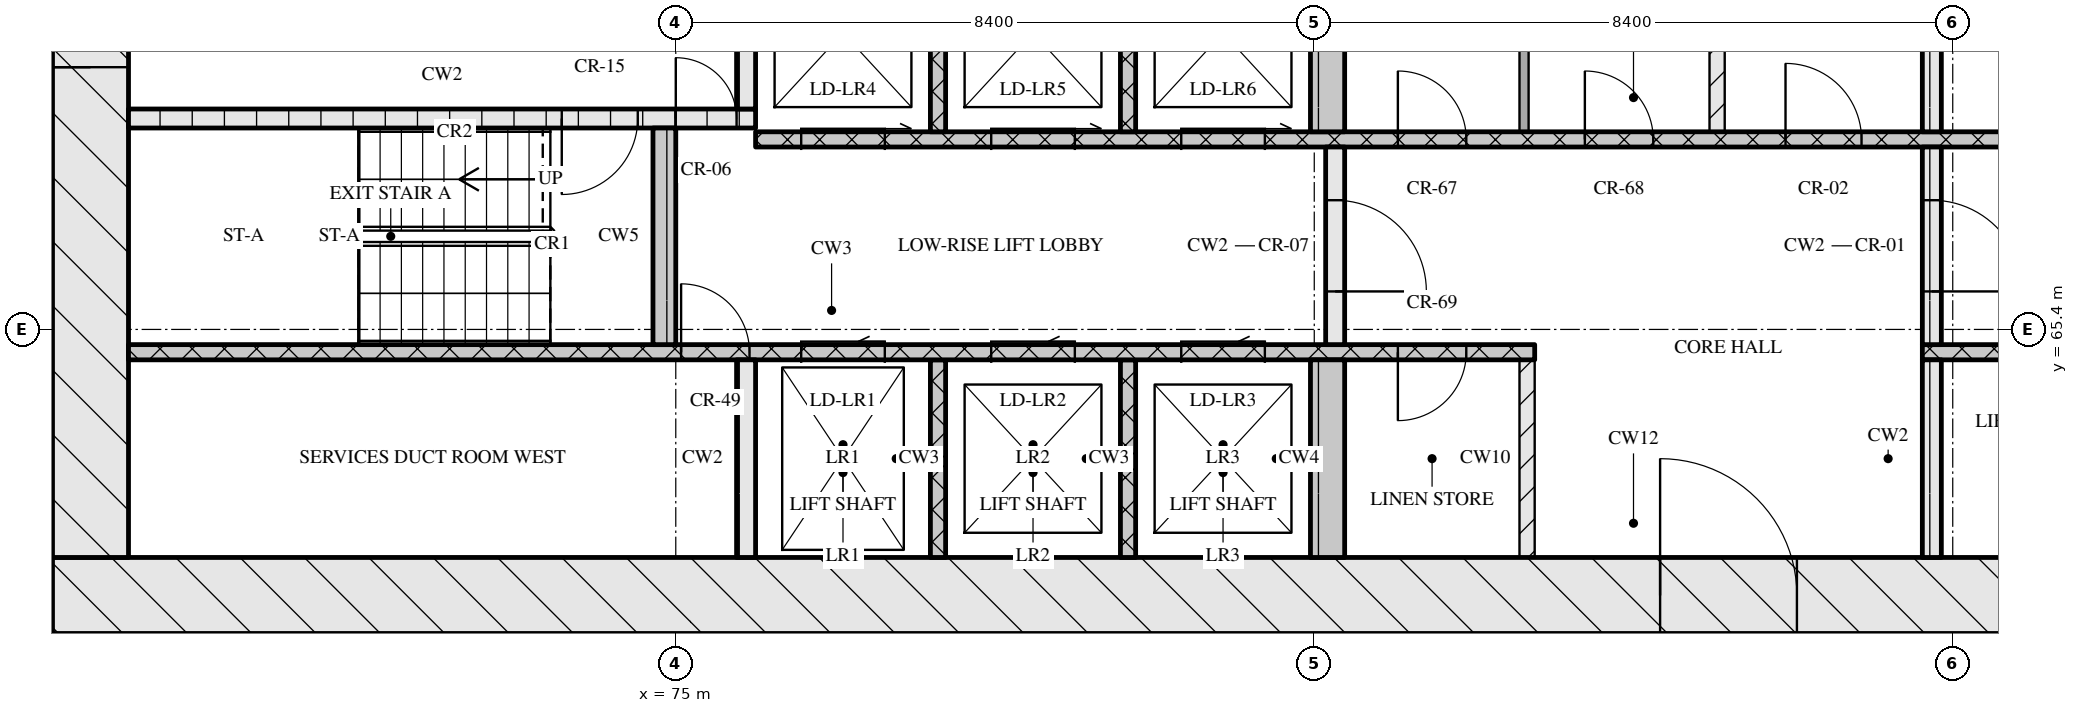
"""IFC4 building model, lengths in metres.
Left out: names, types, materials, properties, quantities, classifications, styles, units other than length and angle.
Written with IfcOpenShell. Run it as: python <this file> out.ifc"""

import sys

from ifc_helpers import new_model, si_unit, direction, frame, frame_2d, origin, place, context, subcontext, project, spatial, rectangle, extrude, element, fill, save


model = new_model("IFC4")
c1 = context("Model", 3, precision=1e-05, world=origin(), true_north=direction((0.0, 1.0)))
c2 = subcontext(c1, "Body", "Model", "MODEL_VIEW")
j1 = project(units=[si_unit("LENGTHUNIT", "METRE"), si_unit("PLANEANGLEUNIT", "RADIAN")], contexts=[c1])
p1 = place(None, origin())
s1 = spatial("IfcSite", under=j1, at=p1, CompositionType="ELEMENT")
p2 = place(p1, origin())
s2 = spatial("IfcBuilding", under=s1, at=p2, CompositionType="ELEMENT")
p3 = place(p2, frame((0.0, 0.0, 127.65)))
s3 = spatial("IfcBuildingStorey", under=s2, at=p3, CompositionType="ELEMENT", Elevation=127.65)
p4 = place(p3, frame((66.8, 61.9, 0.0), z_axis=(0.0, 0.0, 1.0), x_axis=(1.0, 0.0, 0.0)))
e1 = element("IfcWall", 1, at=p4, inside=s3, PredefinedType="SOLIDWALL", context=c2, shape_type="SweptSolid", body=[
    extrude(rectangle(XDim=41.6, YDim=1.0, at=frame_2d((20.8, 0.0))), origin(), (0.0, 0.0, 1.0), 3.32),
])
p5 = place(p4, frame((21.15, 0.0, 0.0)))
e2 = element("IfcOpeningElement", 2, at=p5, cuts=e1, PredefinedType="OPENING", context=c2, shape_type="SweptSolid", body=[
    extrude(rectangle(XDim=1.8, YDim=2.1, at=frame_2d((0.9, 1.05))), frame((0.0, 0.51, 0.0), z_axis=(0.0, -1.0, 0.0), x_axis=(1.0, 0.0, 0.0)), (0.0, 0.0, 1.0), 1.02),
])
p6 = place(p3, frame((67.3, 62.4, 0.0), z_axis=(0.0, 0.0, 1.0), x_axis=(0.0, 1.0, 0.0)))
e3 = element("IfcWall", 3, at=p6, inside=s3, PredefinedType="SOLIDWALL", context=c2, shape_type="SweptSolid", body=[
    extrude(rectangle(XDim=12.0, YDim=1.0, at=frame_2d((6.0, 0.0))), origin(), (0.0, 0.0, 1.0), 3.32),
])
p7 = place(p6, frame((6.45, 0.0, 0.0)))
e4 = element("IfcOpeningElement", 4, at=p7, cuts=e3, PredefinedType="OPENING", context=c2, shape_type="SweptSolid", body=[
    extrude(rectangle(XDim=1.2, YDim=2.1, at=frame_2d((0.6, 1.05))), frame((0.0, 0.51, 0.0), z_axis=(0.0, -1.0, 0.0), x_axis=(1.0, 0.0, 0.0)), (0.0, 0.0, 1.0), 1.02),
])
p8 = place(p3, frame((75.925, 62.4, 0.0), z_axis=(0.0, 0.0, 1.0), x_axis=(0.0, 1.0, 0.0)))
e5 = element("IfcWall", 5, at=p8, inside=s3, PredefinedType="SOLIDWALL", context=c2, shape_type="SweptSolid", body=[
    extrude(rectangle(XDim=2.6, YDim=0.25, at=frame_2d((1.3, 0.0))), origin(), (0.0, 0.0, 1.0), 3.32),
])
for number, where, z_axis, x_axis in (
    (6, (78.45, 62.4, 0.0), (0.0, 0.0, 1.0), (0.0, 1.0, 0.0)),
    (7, (80.95, 62.4, 0.0), (0.0, 0.0, 1.0), (0.0, 1.0, 0.0)),
):
    element("IfcWall", number, at=place(p3, frame(where, z_axis=z_axis, x_axis=x_axis)), inside=s3, PredefinedType="SOLIDWALL", context=c2, shape_type="SweptSolid", body=[
        extrude(rectangle(XDim=2.6, YDim=0.2, at=frame_2d((1.3, 0.0))), origin(), (0.0, 0.0, 1.0), 3.32),
    ])
p9 = place(p3, frame((83.575, 62.4, 0.0), z_axis=(0.0, 0.0, 1.0), x_axis=(0.0, 1.0, 0.0)))
e8 = element("IfcWall", 8, at=p9, inside=s3, PredefinedType="SOLIDWALL", context=c2, shape_type="SweptSolid", body=[
    extrude(rectangle(XDim=2.6, YDim=0.45, at=frame_2d((1.3, 0.0))), origin(), (0.0, 0.0, 1.0), 3.32),
])
p10 = place(p3, frame((86.2, 62.4, 0.0), z_axis=(0.0, 0.0, 1.0), x_axis=(0.0, 1.0, 0.0)))
e9 = element("IfcWall", 9, at=p10, inside=s3, PredefinedType="PARTITIONING", context=c2, shape_type="SweptSolid", body=[
    extrude(rectangle(XDim=2.6, YDim=0.2, at=frame_2d((1.3, 0.0))), origin(), (0.0, 0.0, 1.0), 3.32),
])
p11 = place(p3, frame((91.525, 62.4, 0.0), z_axis=(0.0, 0.0, 1.0), x_axis=(0.0, 1.0, 0.0)))
e10 = element("IfcWall", 10, at=p11, inside=s3, PredefinedType="SOLIDWALL", context=c2, shape_type="SweptSolid", body=[
    extrude(rectangle(XDim=2.6, YDim=0.25, at=frame_2d((1.3, 0.0))), origin(), (0.0, 0.0, 1.0), 3.32),
])
p12 = place(p3, frame((67.8, 65.1, 0.0), z_axis=(0.0, 0.0, 1.0), x_axis=(1.0, 0.0, 0.0)))
e11 = element("IfcWall", 11, at=p12, inside=s3, PredefinedType="SOLIDWALL", context=c2, shape_type="SweptSolid", body=[
    extrude(rectangle(XDim=18.5, YDim=0.2, at=frame_2d((9.25, 0.0))), origin(), (0.0, 0.0, 1.0), 3.32),
])
p13 = place(p12, frame((7.27, 0.0, 0.0)))
e12 = element("IfcOpeningElement", 12, at=p13, cuts=e11, PredefinedType="OPENING", context=c2, shape_type="SweptSolid", body=[
    extrude(rectangle(XDim=0.9, YDim=2.1, at=frame_2d((0.45, 1.05))), frame((0.0, 0.11, 0.0), z_axis=(0.0, -1.0, 0.0), x_axis=(1.0, 0.0, 0.0)), (0.0, 0.0, 1.0), 0.22),
])
p14 = place(p12, frame((8.85, 0.0, 0.0)))
e13 = element("IfcOpeningElement", 13, at=p14, cuts=e11, PredefinedType="OPENING", context=c2, shape_type="SweptSolid", body=[
    extrude(rectangle(XDim=1.1, YDim=2.1, at=frame_2d((0.55, 1.05))), frame((0.0, 0.11, 0.0), z_axis=(0.0, -1.0, 0.0), x_axis=(1.0, 0.0, 0.0)), (0.0, 0.0, 1.0), 0.22),
])
p15 = place(p12, frame((11.35, 0.0, 0.0)))
e14 = element("IfcOpeningElement", 14, at=p15, cuts=e11, PredefinedType="OPENING", context=c2, shape_type="SweptSolid", body=[
    extrude(rectangle(XDim=1.1, YDim=2.1, at=frame_2d((0.55, 1.05))), frame((0.0, 0.11, 0.0), z_axis=(0.0, -1.0, 0.0), x_axis=(1.0, 0.0, 0.0)), (0.0, 0.0, 1.0), 0.22),
])
p16 = place(p12, frame((13.85, 0.0, 0.0)))
e15 = element("IfcOpeningElement", 15, at=p16, cuts=e11, PredefinedType="OPENING", context=c2, shape_type="SweptSolid", body=[
    extrude(rectangle(XDim=1.1, YDim=2.1, at=frame_2d((0.55, 1.05))), frame((0.0, 0.11, 0.0), z_axis=(0.0, -1.0, 0.0), x_axis=(1.0, 0.0, 0.0)), (0.0, 0.0, 1.0), 0.22),
])
p17 = place(p12, frame((16.7, 0.0, 0.0)))
e16 = element("IfcOpeningElement", 16, at=p17, cuts=e11, PredefinedType="OPENING", context=c2, shape_type="SweptSolid", body=[
    extrude(rectangle(XDim=0.9, YDim=2.1, at=frame_2d((0.45, 1.05))), frame((0.0, 0.11, 0.0), z_axis=(0.0, -1.0, 0.0), x_axis=(1.0, 0.0, 0.0)), (0.0, 0.0, 1.0), 0.22),
])
p18 = place(p3, frame((91.4, 65.1, 0.0), z_axis=(0.0, 0.0, 1.0), x_axis=(1.0, 0.0, 0.0)))
e17 = element("IfcWall", 17, at=p18, inside=s3, PredefinedType="SOLIDWALL", context=c2, shape_type="SweptSolid", body=[
    extrude(rectangle(XDim=16.0, YDim=0.2, at=frame_2d((8.0, 0.0))), origin(), (0.0, 0.0, 1.0), 3.32),
])
p19 = place(p18, frame((7.83, 0.0, 0.0)))
e18 = element("IfcOpeningElement", 18, at=p19, cuts=e17, PredefinedType="OPENING", context=c2, shape_type="SweptSolid", body=[
    extrude(rectangle(XDim=0.9, YDim=2.1, at=frame_2d((0.45, 1.05))), frame((0.0, 0.11, 0.0), z_axis=(0.0, -1.0, 0.0), x_axis=(1.0, 0.0, 0.0)), (0.0, 0.0, 1.0), 0.22),
])
p20 = place(p3, frame((74.85, 65.2, 0.0), z_axis=(0.0, 0.0, 1.0), x_axis=(0.0, 1.0, 0.0)))
e19 = element("IfcWall", 19, at=p20, inside=s3, PredefinedType="SOLIDWALL", context=c2, shape_type="SweptSolid", body=[
    extrude(rectangle(XDim=2.85, YDim=0.3, at=frame_2d((1.425, 0.0))), origin(), (0.0, 0.0, 1.0), 3.32),
])
p21 = place(p3, frame((83.675, 65.2, 0.0), z_axis=(0.0, 0.0, 1.0), x_axis=(0.0, 1.0, 0.0)))
e20 = element("IfcWall", 20, at=p21, inside=s3, PredefinedType="SOLIDWALL", context=c2, shape_type="SweptSolid", body=[
    extrude(rectangle(XDim=2.6, YDim=0.25, at=frame_2d((1.3, 0.0))), origin(), (0.0, 0.0, 1.0), 3.32),
])
p22 = place(p21, frame((0.7, 0.0, 0.0)))
e21 = element("IfcOpeningElement", 21, at=p22, cuts=e20, PredefinedType="OPENING", context=c2, shape_type="SweptSolid", body=[
    extrude(rectangle(XDim=1.2, YDim=2.1, at=frame_2d((0.6, 1.05))), frame((0.0, 0.135, 0.0), z_axis=(0.0, -1.0, 0.0), x_axis=(1.0, 0.0, 0.0)), (0.0, 0.0, 1.0), 0.27),
])
p23 = place(p3, frame((91.525, 65.2, 0.0), z_axis=(0.0, 0.0, 1.0), x_axis=(0.0, 1.0, 0.0)))
e22 = element("IfcWall", 22, at=p23, inside=s3, PredefinedType="SOLIDWALL", context=c2, shape_type="SweptSolid", body=[
    extrude(rectangle(XDim=2.6, YDim=0.25, at=frame_2d((1.3, 0.0))), origin(), (0.0, 0.0, 1.0), 3.32),
])
p24 = place(p23, frame((0.7, 0.0, 0.0)))
e23 = element("IfcOpeningElement", 23, at=p24, cuts=e22, PredefinedType="OPENING", context=c2, shape_type="SweptSolid", body=[
    extrude(rectangle(XDim=1.2, YDim=2.1, at=frame_2d((0.6, 1.05))), frame((0.0, 0.135, 0.0), z_axis=(0.0, -1.0, 0.0), x_axis=(1.0, 0.0, 0.0)), (0.0, 0.0, 1.0), 0.27),
])
p25 = place(p3, frame((76.05, 67.9, 0.0), z_axis=(0.0, 0.0, 1.0), x_axis=(1.0, 0.0, 0.0)))
e24 = element("IfcWall", 24, at=p25, inside=s3, PredefinedType="SOLIDWALL", context=c2, shape_type="SweptSolid", body=[
    extrude(rectangle(XDim=23.1, YDim=0.2, at=frame_2d((11.55, 0.0))), origin(), (0.0, 0.0, 1.0), 3.32),
])
p26 = place(p25, frame((0.6, 0.0, 0.0)))
e25 = element("IfcOpeningElement", 25, at=p26, cuts=e24, PredefinedType="OPENING", context=c2, shape_type="SweptSolid", body=[
    extrude(rectangle(XDim=1.1, YDim=2.1, at=frame_2d((0.55, 1.05))), frame((0.0, 0.11, 0.0), z_axis=(0.0, -1.0, 0.0), x_axis=(1.0, 0.0, 0.0)), (0.0, 0.0, 1.0), 0.22),
])
p27 = place(p25, frame((3.1, 0.0, 0.0)))
e26 = element("IfcOpeningElement", 26, at=p27, cuts=e24, PredefinedType="OPENING", context=c2, shape_type="SweptSolid", body=[
    extrude(rectangle(XDim=1.1, YDim=2.1, at=frame_2d((0.55, 1.05))), frame((0.0, 0.11, 0.0), z_axis=(0.0, -1.0, 0.0), x_axis=(1.0, 0.0, 0.0)), (0.0, 0.0, 1.0), 0.22),
])
p28 = place(p25, frame((5.6, 0.0, 0.0)))
e27 = element("IfcOpeningElement", 27, at=p28, cuts=e24, PredefinedType="OPENING", context=c2, shape_type="SweptSolid", body=[
    extrude(rectangle(XDim=1.1, YDim=2.1, at=frame_2d((0.55, 1.05))), frame((0.0, 0.11, 0.0), z_axis=(0.0, -1.0, 0.0), x_axis=(1.0, 0.0, 0.0)), (0.0, 0.0, 1.0), 0.22),
])
p29 = place(p25, frame((8.45, 0.0, 0.0)))
e28 = element("IfcOpeningElement", 28, at=p29, cuts=e24, PredefinedType="OPENING", context=c2, shape_type="SweptSolid", body=[
    extrude(rectangle(XDim=0.9, YDim=2.1, at=frame_2d((0.45, 1.05))), frame((0.0, 0.11, 0.0), z_axis=(0.0, -1.0, 0.0), x_axis=(1.0, 0.0, 0.0)), (0.0, 0.0, 1.0), 0.22),
])
p30 = place(p25, frame((10.91, 0.0, 0.0)))
e29 = element("IfcOpeningElement", 29, at=p30, cuts=e24, PredefinedType="OPENING", context=c2, shape_type="SweptSolid", body=[
    extrude(rectangle(XDim=0.9, YDim=2.1, at=frame_2d((0.45, 1.05))), frame((0.0, 0.11, 0.0), z_axis=(0.0, -1.0, 0.0), x_axis=(1.0, 0.0, 0.0)), (0.0, 0.0, 1.0), 0.22),
])
p31 = place(p25, frame((13.55, 0.0, 0.0)))
e30 = element("IfcOpeningElement", 30, at=p31, cuts=e24, PredefinedType="OPENING", context=c2, shape_type="SweptSolid", body=[
    extrude(rectangle(XDim=1.0, YDim=2.1, at=frame_2d((0.5, 1.05))), frame((0.0, 0.11, 0.0), z_axis=(0.0, -1.0, 0.0), x_axis=(1.0, 0.0, 0.0)), (0.0, 0.0, 1.0), 0.22),
])
for number, where, z_axis, x_axis in (
    (31, (78.45, 68.0, 0.0), (0.0, 0.0, 1.0), (0.0, 1.0, 0.0)),
    (32, (80.95, 68.0, 0.0), (0.0, 0.0, 1.0), (0.0, 1.0, 0.0)),
):
    element("IfcWall", number, at=place(p3, frame(where, z_axis=z_axis, x_axis=x_axis)), inside=s3, PredefinedType="SOLIDWALL", context=c2, shape_type="SweptSolid", body=[
        extrude(rectangle(XDim=2.6, YDim=0.2, at=frame_2d((1.3, 0.0))), origin(), (0.0, 0.0, 1.0), 3.32),
    ])
p32 = place(p3, frame((83.575, 68.0, 0.0), z_axis=(0.0, 0.0, 1.0), x_axis=(0.0, 1.0, 0.0)))
e33 = element("IfcWall", 33, at=p32, inside=s3, PredefinedType="SOLIDWALL", context=c2, shape_type="SweptSolid", body=[
    extrude(rectangle(XDim=2.6, YDim=0.45, at=frame_2d((1.3, 0.0))), origin(), (0.0, 0.0, 1.0), 3.32),
])
p33 = place(p3, frame((86.16, 68.0, 0.0), z_axis=(0.0, 0.0, 1.0), x_axis=(0.0, 1.0, 0.0)))
e34 = element("IfcWall", 34, at=p33, inside=s3, PredefinedType="PARTITIONING", context=c2, shape_type="SweptSolid", body=[
    extrude(rectangle(XDim=2.6, YDim=0.12, at=frame_2d((1.3, 0.0))), origin(), (0.0, 0.0, 1.0), 3.32),
])
p34 = place(p3, frame((88.7, 68.0, 0.0), z_axis=(0.0, 0.0, 1.0), x_axis=(0.0, 1.0, 0.0)))
e35 = element("IfcWall", 35, at=p34, inside=s3, PredefinedType="PARTITIONING", context=c2, shape_type="SweptSolid", body=[
    extrude(rectangle(XDim=2.6, YDim=0.2, at=frame_2d((1.3, 0.0))), origin(), (0.0, 0.0, 1.0), 3.32),
])
p35 = place(p3, frame((91.525, 68.0, 0.0), z_axis=(0.0, 0.0, 1.0), x_axis=(0.0, 1.0, 0.0)))
e36 = element("IfcWall", 36, at=p35, inside=s3, PredefinedType="SOLIDWALL", context=c2, shape_type="SweptSolid", body=[
    extrude(rectangle(XDim=2.6, YDim=0.25, at=frame_2d((1.3, 0.0))), origin(), (0.0, 0.0, 1.0), 3.32),
])
p36 = place(p3, frame((67.8, 68.175, 0.0), z_axis=(0.0, 0.0, 1.0), x_axis=(1.0, 0.0, 0.0)))
e37 = element("IfcWall", 37, at=p36, inside=s3, PredefinedType="SOLIDWALL", context=c2, shape_type="SweptSolid", body=[
    extrude(rectangle(XDim=8.25, YDim=0.25, at=frame_2d((4.125, 0.0))), origin(), (0.0, 0.0, 1.0), 3.32),
])
p37 = place(p36, frame((5.7, 0.0, 0.0)))
e38 = element("IfcOpeningElement", 38, at=p37, cuts=e37, PredefinedType="OPENING", context=c2, shape_type="SweptSolid", body=[
    extrude(rectangle(XDim=1.0, YDim=2.1, at=frame_2d((0.5, 1.05))), frame((0.0, 0.135, 0.0), z_axis=(0.0, -1.0, 0.0), x_axis=(1.0, 0.0, 0.0)), (0.0, 0.0, 1.0), 0.27),
])
p38 = place(p36, frame((7.2, 0.0, 0.0)))
e39 = element("IfcOpeningElement", 39, at=p38, cuts=e37, PredefinedType="OPENING", context=c2, shape_type="SweptSolid", body=[
    extrude(rectangle(XDim=0.8, YDim=2.1, at=frame_2d((0.4, 1.05))), frame((0.0, 0.135, 0.0), z_axis=(0.0, -1.0, 0.0), x_axis=(1.0, 0.0, 0.0)), (0.0, 0.0, 1.0), 0.27),
])
p39 = place(p3, frame((75.925, 68.3, 0.0), z_axis=(0.0, 0.0, 1.0), x_axis=(0.0, 1.0, 0.0)))
e40 = element("IfcWall", 40, at=p39, inside=s3, PredefinedType="SOLIDWALL", context=c2, shape_type="SweptSolid", body=[
    extrude(rectangle(XDim=2.3, YDim=0.25, at=frame_2d((1.15, 0.0))), origin(), (0.0, 0.0, 1.0), 3.32),
])
p40 = place(p5, origin())
e41 = element("IfcDoor", 41, at=p40, inside=s3, OperationType="DOUBLE_DOOR_SINGLE_SWING", PredefinedType="DOOR", context=c2, shape_type="SweptSolid", body=[
    extrude(rectangle(XDim=1.8, YDim=2.1, at=frame_2d((0.9, 1.05))), frame((0.0, 0.025, 0.0), z_axis=(0.0, -1.0, 0.0), x_axis=(1.0, 0.0, 0.0)), (0.0, 0.0, 1.0), 0.05),
])
fill(e2, e41)
p41 = place(p13, origin())
e42 = element("IfcDoor", 42, at=p41, inside=s3, OperationType="SINGLE_SWING_LEFT", PredefinedType="DOOR", context=c2, shape_type="SweptSolid", body=[
    extrude(rectangle(XDim=0.9, YDim=2.1, at=frame_2d((0.45, 1.05))), frame((0.0, 0.025, 0.0), z_axis=(0.0, -1.0, 0.0), x_axis=(1.0, 0.0, 0.0)), (0.0, 0.0, 1.0), 0.05),
])
fill(e12, e42)
p42 = place(p14, origin())
e43 = element("IfcDoor", 43, at=p42, inside=s3, OperationType="SLIDING_TO_LEFT", PredefinedType="DOOR", context=c2, shape_type="SweptSolid", body=[
    extrude(rectangle(XDim=1.1, YDim=2.1, at=frame_2d((0.55, 1.05))), frame((0.0, 0.025, 0.0), z_axis=(0.0, -1.0, 0.0), x_axis=(1.0, 0.0, 0.0)), (0.0, 0.0, 1.0), 0.05),
])
fill(e13, e43)
p43 = place(p15, origin())
e44 = element("IfcDoor", 44, at=p43, inside=s3, OperationType="SLIDING_TO_LEFT", PredefinedType="DOOR", context=c2, shape_type="SweptSolid", body=[
    extrude(rectangle(XDim=1.1, YDim=2.1, at=frame_2d((0.55, 1.05))), frame((0.0, 0.025, 0.0), z_axis=(0.0, -1.0, 0.0), x_axis=(1.0, 0.0, 0.0)), (0.0, 0.0, 1.0), 0.05),
])
fill(e14, e44)
p44 = place(p16, origin())
e45 = element("IfcDoor", 45, at=p44, inside=s3, OperationType="SLIDING_TO_LEFT", PredefinedType="DOOR", context=c2, shape_type="SweptSolid", body=[
    extrude(rectangle(XDim=1.1, YDim=2.1, at=frame_2d((0.55, 1.05))), frame((0.0, 0.025, 0.0), z_axis=(0.0, -1.0, 0.0), x_axis=(1.0, 0.0, 0.0)), (0.0, 0.0, 1.0), 0.05),
])
fill(e15, e45)
p45 = place(p17, origin())
e46 = element("IfcDoor", 46, at=p45, inside=s3, OperationType="SINGLE_SWING_RIGHT", PredefinedType="DOOR", context=c2, shape_type="SweptSolid", body=[
    extrude(rectangle(XDim=0.9, YDim=2.1, at=frame_2d((0.45, 1.05))), frame((0.0, 0.025, 0.0), z_axis=(0.0, -1.0, 0.0), x_axis=(1.0, 0.0, 0.0)), (0.0, 0.0, 1.0), 0.05),
])
fill(e16, e46)
p46 = place(p22, origin())
e47 = element("IfcDoor", 47, at=p46, inside=s3, OperationType="SINGLE_SWING_RIGHT", PredefinedType="DOOR", context=c2, shape_type="SweptSolid", body=[
    extrude(rectangle(XDim=1.2, YDim=2.1, at=frame_2d((0.6, 1.05))), frame((0.0, 0.025, 0.0), z_axis=(0.0, -1.0, 0.0), x_axis=(1.0, 0.0, 0.0)), (0.0, 0.0, 1.0), 0.05),
])
fill(e21, e47)
p47 = place(p24, origin())
e48 = element("IfcDoor", 48, at=p47, inside=s3, OperationType="SINGLE_SWING_RIGHT", PredefinedType="DOOR", context=c2, shape_type="SweptSolid", body=[
    extrude(rectangle(XDim=1.2, YDim=2.1, at=frame_2d((0.6, 1.05))), frame((0.0, 0.025, 0.0), z_axis=(0.0, -1.0, 0.0), x_axis=(1.0, 0.0, 0.0)), (0.0, 0.0, 1.0), 0.05),
])
fill(e23, e48)
p48 = place(p26, origin())
e49 = element("IfcDoor", 49, at=p48, inside=s3, OperationType="SLIDING_TO_RIGHT", PredefinedType="DOOR", context=c2, shape_type="SweptSolid", body=[
    extrude(rectangle(XDim=1.1, YDim=2.1, at=frame_2d((0.55, 1.05))), frame((0.0, 0.025, 0.0), z_axis=(0.0, -1.0, 0.0), x_axis=(1.0, 0.0, 0.0)), (0.0, 0.0, 1.0), 0.05),
])
fill(e25, e49)
p49 = place(p27, origin())
e50 = element("IfcDoor", 50, at=p49, inside=s3, OperationType="SLIDING_TO_RIGHT", PredefinedType="DOOR", context=c2, shape_type="SweptSolid", body=[
    extrude(rectangle(XDim=1.1, YDim=2.1, at=frame_2d((0.55, 1.05))), frame((0.0, 0.025, 0.0), z_axis=(0.0, -1.0, 0.0), x_axis=(1.0, 0.0, 0.0)), (0.0, 0.0, 1.0), 0.05),
])
fill(e26, e50)
p50 = place(p28, origin())
e51 = element("IfcDoor", 51, at=p50, inside=s3, OperationType="SLIDING_TO_RIGHT", PredefinedType="DOOR", context=c2, shape_type="SweptSolid", body=[
    extrude(rectangle(XDim=1.1, YDim=2.1, at=frame_2d((0.55, 1.05))), frame((0.0, 0.025, 0.0), z_axis=(0.0, -1.0, 0.0), x_axis=(1.0, 0.0, 0.0)), (0.0, 0.0, 1.0), 0.05),
])
fill(e27, e51)
p51 = place(p29, origin())
e52 = element("IfcDoor", 52, at=p51, inside=s3, OperationType="SINGLE_SWING_LEFT", PredefinedType="DOOR", context=c2, shape_type="SweptSolid", body=[
    extrude(rectangle(XDim=0.9, YDim=2.1, at=frame_2d((0.45, 1.05))), frame((0.0, 0.025, 0.0), z_axis=(0.0, -1.0, 0.0), x_axis=(1.0, 0.0, 0.0)), (0.0, 0.0, 1.0), 0.05),
])
fill(e28, e52)
p52 = place(p30, origin())
e53 = element("IfcDoor", 53, at=p52, inside=s3, OperationType="SINGLE_SWING_LEFT", PredefinedType="DOOR", context=c2, shape_type="SweptSolid", body=[
    extrude(rectangle(XDim=0.9, YDim=2.1, at=frame_2d((0.45, 1.05))), frame((0.0, 0.025, 0.0), z_axis=(0.0, -1.0, 0.0), x_axis=(1.0, 0.0, 0.0)), (0.0, 0.0, 1.0), 0.05),
])
fill(e29, e53)
p53 = place(p31, origin())
e54 = element("IfcDoor", 54, at=p53, inside=s3, OperationType="SINGLE_SWING_LEFT", PredefinedType="DOOR", context=c2, shape_type="SweptSolid", body=[
    extrude(rectangle(XDim=1.0, YDim=2.1, at=frame_2d((0.5, 1.05))), frame((0.0, 0.025, 0.0), z_axis=(0.0, -1.0, 0.0), x_axis=(1.0, 0.0, 0.0)), (0.0, 0.0, 1.0), 0.05),
])
fill(e30, e54)
p54 = place(p37, origin())
e55 = element("IfcDoor", 55, at=p54, inside=s3, OperationType="SINGLE_SWING_RIGHT", PredefinedType="DOOR", context=c2, shape_type="SweptSolid", body=[
    extrude(rectangle(XDim=1.0, YDim=2.1, at=frame_2d((0.5, 1.05))), frame((0.0, 0.025, 0.0), z_axis=(0.0, -1.0, 0.0), x_axis=(1.0, 0.0, 0.0)), (0.0, 0.0, 1.0), 0.05),
])
fill(e38, e55)
p55 = place(p38, origin())
e56 = element("IfcDoor", 56, at=p55, inside=s3, OperationType="SINGLE_SWING_LEFT", PredefinedType="DOOR", context=c2, shape_type="SweptSolid", body=[
    extrude(rectangle(XDim=0.8, YDim=2.1, at=frame_2d((0.4, 1.05))), frame((0.0, 0.025, 0.0), z_axis=(0.0, -1.0, 0.0), x_axis=(1.0, 0.0, 0.0)), (0.0, 0.0, 1.0), 0.05),
])
fill(e39, e56)
p56 = place(p7, origin())
e57 = element("IfcDoor", 57, at=p56, inside=s3, OperationType="SINGLE_SWING_LEFT", PredefinedType="DOOR", context=c2, shape_type="SweptSolid", body=[
    extrude(rectangle(XDim=1.2, YDim=2.1, at=frame_2d((0.6, 1.05))), frame((0.0, 0.025, 0.0), z_axis=(0.0, -1.0, 0.0), x_axis=(1.0, 0.0, 0.0)), (0.0, 0.0, 1.0), 0.05),
])
fill(e4, e57)
save(model, sys.argv[1])
